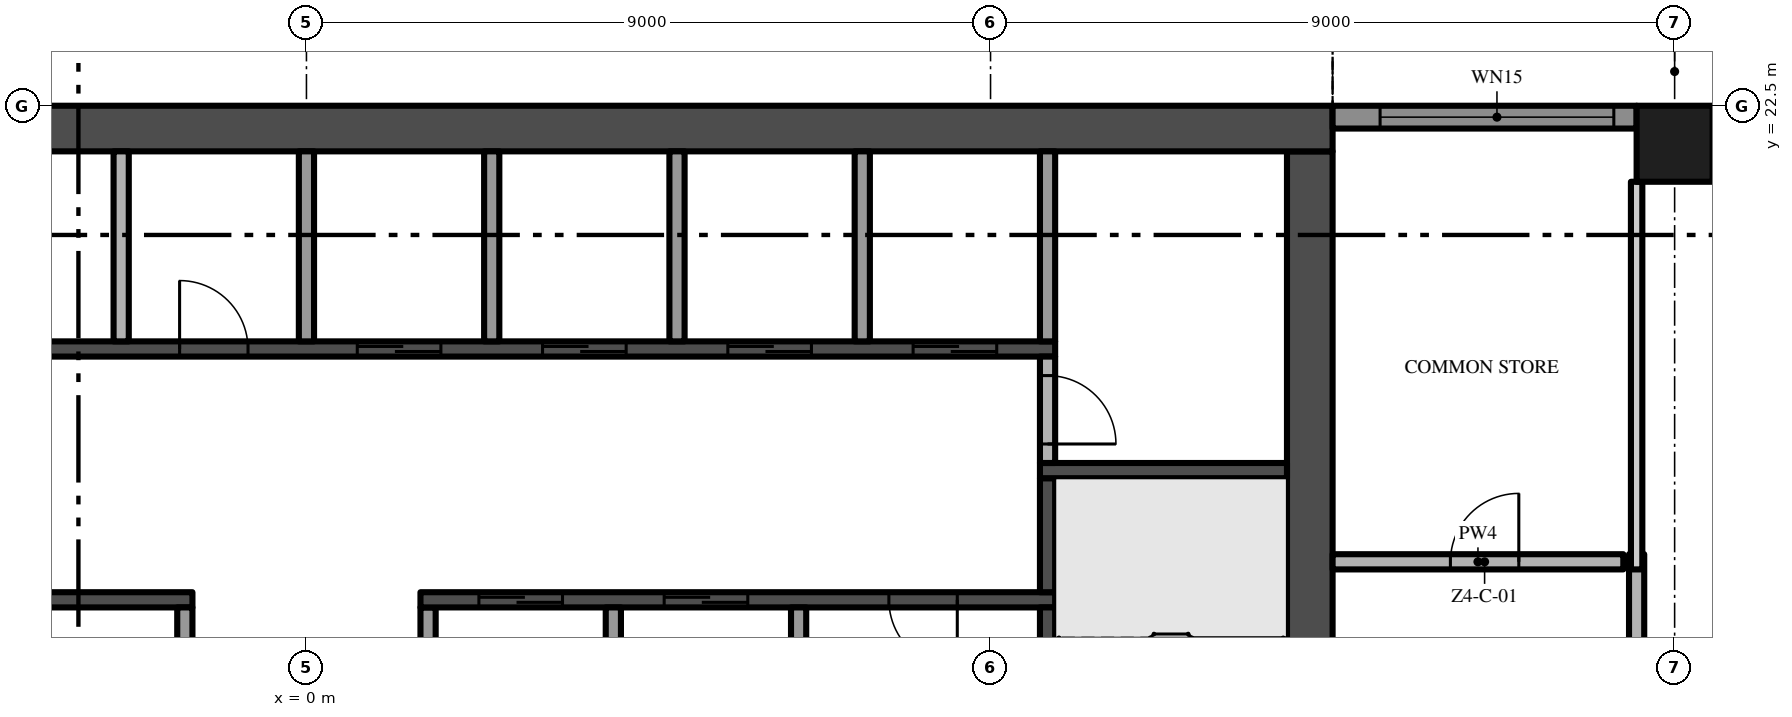
"""IFC4 building model, lengths in metres.
Left out: names, types, materials, properties, quantities, classifications, styles, units other than length and angle.
Written with IfcOpenShell. Run it as: python <this file> out.ifc"""

import sys

from ifc_helpers import new_model, si_unit, direction, frame, frame_2d, origin, origin_2d, place, context, subcontext, project, spatial, rectangle, extrude, element, fill, save


model = new_model("IFC4")
c1 = context("Model", 3, precision=1e-05, world=origin(), true_north=direction((0.0, 1.0)))
c2 = subcontext(c1, "Body", "Model", "MODEL_VIEW")
j1 = project(units=[si_unit("LENGTHUNIT", "METRE"), si_unit("PLANEANGLEUNIT", "RADIAN")], contexts=[c1])
p1 = place(None, origin())
s1 = spatial("IfcSite", under=j1, at=p1, CompositionType="ELEMENT")
p2 = place(p1, origin())
s2 = spatial("IfcBuilding", under=s1, at=p2, CompositionType="ELEMENT")
p3 = place(p2, frame((0.0, 0.0, 211.0)))
s3 = spatial("IfcBuildingStorey", under=s2, at=p3, CompositionType="ELEMENT", Elevation=211.0)
p4 = place(p3, frame((13.2, 5.1, -0.3), z_axis=(0.0, 0.0, 1.0), x_axis=(0.0, 1.0, 0.0)))
e1 = element("IfcWall", 1, at=p4, inside=s3, PredefinedType="SHEAR", context=c2, shape_type="SweptSolid", body=[
    extrude(rectangle(XDim=16.8, YDim=0.6, at=frame_2d((8.4, 0.0))), origin(), (0.0, 0.0, 1.0), 3.8),
])
p5 = place(p4, frame((6.3, 0.0, 0.3)))
e2 = element("IfcOpeningElement", 2, at=p5, cuts=e1, PredefinedType="OPENING", context=c2, shape_type="SweptSolid", body=[
    extrude(rectangle(XDim=1.2, YDim=2.2, at=frame_2d((0.6, 1.1))), frame((0.0, 0.31, 0.0), z_axis=(0.0, -1.0, 0.0), x_axis=(1.0, 0.0, 0.0)), (0.0, 0.0, 1.0), 0.62),
])
p6 = place(p3, frame((13.5, 22.2, -0.3), z_axis=(0.0, 0.0, 1.0), x_axis=(-1.0, 0.0, 0.0)))
e3 = element("IfcWall", 3, at=p6, inside=s3, PredefinedType="SHEAR", context=c2, shape_type="SweptSolid", body=[
    extrude(rectangle(XDim=27.0, YDim=0.6, at=frame_2d((13.5, 0.0))), origin(), (0.0, 0.0, 1.0), 3.8),
])
p7 = place(p3, frame((18.0, 22.0, 0.0), z_axis=(0.0, 0.0, 1.0), x_axis=(1.0, 0.0, 0.0)))
e4 = element("IfcColumn", 4, at=p7, inside=s3, PredefinedType="COLUMN", context=c2, shape_type="SweptSolid", body=[
    extrude(rectangle(XDim=1.0, YDim=1.0, at=origin_2d()), origin(), (0.0, 0.0, 1.0), 3.5),
])
p8 = place(p3, frame((13.5, 22.35, 0.0), z_axis=(0.0, 0.0, 1.0), x_axis=(1.0, 0.0, 0.0)))
e5 = element("IfcWall", 5, at=p8, inside=s3, PredefinedType="SOLIDWALL", context=c2, shape_type="SweptSolid", body=[
    extrude(rectangle(XDim=4.0, YDim=0.3, at=frame_2d((2.0, 0.0))), origin(), (0.0, 0.0, 1.0), 3.5),
])
p9 = place(p8, frame((0.625, 0.0, 0.45)))
e6 = element("IfcOpeningElement", 6, at=p9, cuts=e5, PredefinedType="OPENING", context=c2, shape_type="SweptSolid", body=[
    extrude(rectangle(XDim=3.075, YDim=2.65, at=frame_2d((1.538, 1.325))), frame((0.0, 0.16, 0.0), z_axis=(0.0, -1.0, 0.0), x_axis=(1.0, 0.0, 0.0)), (0.0, 0.0, 1.0), 0.32),
])
p10 = place(p3, frame((-1.5, 16.0, 0.0), z_axis=(0.0, 0.0, 1.0), x_axis=(-1.0, 0.0, 0.0)))
e7 = element("IfcWall", 7, at=p10, inside=s3, PredefinedType="SHEAR", context=c2, shape_type="SweptSolid", body=[
    extrude(rectangle(XDim=8.35, YDim=0.2, at=frame_2d((4.175, 0.0))), origin(), (0.0, 0.0, 1.0), 3.5),
])
p11 = place(p10, frame((6.162, 0.0, 0.0)))
e8 = element("IfcOpeningElement", 8, at=p11, cuts=e7, PredefinedType="OPENING", context=c2, shape_type="SweptSolid", body=[
    extrude(rectangle(XDim=0.9, YDim=2.1, at=frame_2d((0.45, 1.05))), frame((0.0, 0.11, 0.0), z_axis=(0.0, -1.0, 0.0), x_axis=(1.0, 0.0, 0.0)), (0.0, 0.0, 1.0), 0.22),
])
p12 = place(p3, frame((-9.85, 19.3, 0.0), z_axis=(0.0, 0.0, 1.0), x_axis=(1.0, 0.0, 0.0)))
e9 = element("IfcWall", 9, at=p12, inside=s3, PredefinedType="SHEAR", context=c2, shape_type="SweptSolid", body=[
    extrude(rectangle(XDim=19.7, YDim=0.2, at=frame_2d((9.85, 0.0))), origin(), (0.0, 0.0, 1.0), 3.5),
])
p13 = place(p12, frame((10.519, 0.0, 0.0)))
e10 = element("IfcOpeningElement", 10, at=p13, cuts=e9, PredefinedType="OPENING", context=c2, shape_type="SweptSolid", body=[
    extrude(rectangle(XDim=1.1, YDim=2.1, at=frame_2d((0.55, 1.05))), frame((0.0, 0.11, 0.0), z_axis=(0.0, -1.0, 0.0), x_axis=(1.0, 0.0, 0.0)), (0.0, 0.0, 1.0), 0.22),
])
p14 = place(p12, frame((12.956, 0.0, 0.0)))
e11 = element("IfcOpeningElement", 11, at=p14, cuts=e9, PredefinedType="OPENING", context=c2, shape_type="SweptSolid", body=[
    extrude(rectangle(XDim=1.1, YDim=2.1, at=frame_2d((0.55, 1.05))), frame((0.0, 0.11, 0.0), z_axis=(0.0, -1.0, 0.0), x_axis=(1.0, 0.0, 0.0)), (0.0, 0.0, 1.0), 0.22),
])
p15 = place(p12, frame((15.394, 0.0, 0.0)))
e12 = element("IfcOpeningElement", 12, at=p15, cuts=e9, PredefinedType="OPENING", context=c2, shape_type="SweptSolid", body=[
    extrude(rectangle(XDim=1.1, YDim=2.1, at=frame_2d((0.55, 1.05))), frame((0.0, 0.11, 0.0), z_axis=(0.0, -1.0, 0.0), x_axis=(1.0, 0.0, 0.0)), (0.0, 0.0, 1.0), 0.22),
])
p16 = place(p12, frame((17.831, 0.0, 0.0)))
e13 = element("IfcOpeningElement", 13, at=p16, cuts=e9, PredefinedType="OPENING", context=c2, shape_type="SweptSolid", body=[
    extrude(rectangle(XDim=1.1, YDim=2.1, at=frame_2d((0.55, 1.05))), frame((0.0, 0.11, 0.0), z_axis=(0.0, -1.0, 0.0), x_axis=(1.0, 0.0, 0.0)), (0.0, 0.0, 1.0), 0.22),
])
p17 = place(p12, frame((3.306, 0.0, 0.0)))
e14 = element("IfcOpeningElement", 14, at=p17, cuts=e9, PredefinedType="OPENING", context=c2, shape_type="SweptSolid", body=[
    extrude(rectangle(XDim=0.9, YDim=2.1, at=frame_2d((0.45, 1.05))), frame((0.0, 0.11, 0.0), z_axis=(0.0, -1.0, 0.0), x_axis=(1.0, 0.0, 0.0)), (0.0, 0.0, 1.0), 0.22),
])
p18 = place(p12, frame((8.181, 0.0, 0.0)))
e15 = element("IfcOpeningElement", 15, at=p18, cuts=e9, PredefinedType="OPENING", context=c2, shape_type="SweptSolid", body=[
    extrude(rectangle(XDim=0.9, YDim=2.1, at=frame_2d((0.45, 1.05))), frame((0.0, 0.11, 0.0), z_axis=(0.0, -1.0, 0.0), x_axis=(1.0, 0.0, 0.0)), (0.0, 0.0, 1.0), 0.22),
])
p19 = place(p3, frame((-2.438, 19.4, 0.0), z_axis=(0.0, 0.0, 1.0), x_axis=(0.0, 1.0, 0.0)))
e16 = element("IfcWall", 16, at=p19, inside=s3, PredefinedType="PARTITIONING", context=c2, shape_type="SweptSolid", body=[
    extrude(rectangle(XDim=2.5, YDim=0.2, at=frame_2d((1.25, 0.0))), origin(), (0.0, 0.0, 1.0), 3.5),
])
p20 = place(p3, frame((-1.6, 13.7, 0.0), z_axis=(0.0, 0.0, 1.0), x_axis=(0.0, 1.0, 0.0)))
e17 = element("IfcWall", 17, at=p20, inside=s3, PredefinedType="PARTITIONING", context=c2, shape_type="SweptSolid", body=[
    extrude(rectangle(XDim=2.2, YDim=0.2, at=frame_2d((1.1, 0.0))), origin(), (0.0, 0.0, 1.0), 3.5),
])
p21 = place(p3, frame((0.0, 19.4, 0.0), z_axis=(0.0, 0.0, 1.0), x_axis=(0.0, 1.0, 0.0)))
e18 = element("IfcWall", 18, at=p21, inside=s3, PredefinedType="PARTITIONING", context=c2, shape_type="SweptSolid", body=[
    extrude(rectangle(XDim=2.5, YDim=0.2, at=frame_2d((1.25, 0.0))), origin(), (0.0, 0.0, 1.0), 3.5),
])
p22 = place(p3, frame((1.6, 13.7, 0.0), z_axis=(0.0, 0.0, 1.0), x_axis=(0.0, 1.0, 0.0)))
e19 = element("IfcWall", 19, at=p22, inside=s3, PredefinedType="PARTITIONING", context=c2, shape_type="SweptSolid", body=[
    extrude(rectangle(XDim=2.2, YDim=0.2, at=frame_2d((1.1, 0.0))), origin(), (0.0, 0.0, 1.0), 3.5),
])
p23 = place(p3, frame((9.85, 16.0, 0.0), z_axis=(0.0, 0.0, 1.0), x_axis=(-1.0, 0.0, 0.0)))
e20 = element("IfcWall", 20, at=p23, inside=s3, PredefinedType="SHEAR", context=c2, shape_type="SweptSolid", body=[
    extrude(rectangle(XDim=8.35, YDim=0.2, at=frame_2d((4.175, 0.0))), origin(), (0.0, 0.0, 1.0), 3.5),
])
p24 = place(p23, frame((6.481, 0.0, 0.0)))
e21 = element("IfcOpeningElement", 21, at=p24, cuts=e20, PredefinedType="OPENING", context=c2, shape_type="SweptSolid", body=[
    extrude(rectangle(XDim=1.1, YDim=2.1, at=frame_2d((0.55, 1.05))), frame((0.0, 0.11, 0.0), z_axis=(0.0, -1.0, 0.0), x_axis=(1.0, 0.0, 0.0)), (0.0, 0.0, 1.0), 0.22),
])
p25 = place(p23, frame((4.044, 0.0, 0.0)))
e22 = element("IfcOpeningElement", 22, at=p25, cuts=e20, PredefinedType="OPENING", context=c2, shape_type="SweptSolid", body=[
    extrude(rectangle(XDim=1.1, YDim=2.1, at=frame_2d((0.55, 1.05))), frame((0.0, 0.11, 0.0), z_axis=(0.0, -1.0, 0.0), x_axis=(1.0, 0.0, 0.0)), (0.0, 0.0, 1.0), 0.22),
])
p26 = place(p23, frame((1.288, 0.0, 0.0)))
e23 = element("IfcOpeningElement", 23, at=p26, cuts=e20, PredefinedType="OPENING", context=c2, shape_type="SweptSolid", body=[
    extrude(rectangle(XDim=0.9, YDim=2.1, at=frame_2d((0.45, 1.05))), frame((0.0, 0.11, 0.0), z_axis=(0.0, -1.0, 0.0), x_axis=(1.0, 0.0, 0.0)), (0.0, 0.0, 1.0), 0.22),
])
p27 = place(p3, frame((2.438, 19.4, 0.0), z_axis=(0.0, 0.0, 1.0), x_axis=(0.0, 1.0, 0.0)))
e24 = element("IfcWall", 24, at=p27, inside=s3, PredefinedType="PARTITIONING", context=c2, shape_type="SweptSolid", body=[
    extrude(rectangle(XDim=2.5, YDim=0.2, at=frame_2d((1.25, 0.0))), origin(), (0.0, 0.0, 1.0), 3.5),
])
p28 = place(p3, frame((4.037, 13.7, 0.0), z_axis=(0.0, 0.0, 1.0), x_axis=(0.0, 1.0, 0.0)))
e25 = element("IfcWall", 25, at=p28, inside=s3, PredefinedType="PARTITIONING", context=c2, shape_type="SweptSolid", body=[
    extrude(rectangle(XDim=2.2, YDim=0.2, at=frame_2d((1.1, 0.0))), origin(), (0.0, 0.0, 1.0), 3.5),
])
p29 = place(p3, frame((4.875, 19.4, 0.0), z_axis=(0.0, 0.0, 1.0), x_axis=(0.0, 1.0, 0.0)))
e26 = element("IfcWall", 26, at=p29, inside=s3, PredefinedType="PARTITIONING", context=c2, shape_type="SweptSolid", body=[
    extrude(rectangle(XDim=2.5, YDim=0.2, at=frame_2d((1.25, 0.0))), origin(), (0.0, 0.0, 1.0), 3.5),
])
p30 = place(p3, frame((6.475, 13.7, 0.0), z_axis=(0.0, 0.0, 1.0), x_axis=(0.0, 1.0, 0.0)))
e27 = element("IfcWall", 27, at=p30, inside=s3, PredefinedType="PARTITIONING", context=c2, shape_type="SweptSolid", body=[
    extrude(rectangle(XDim=2.2, YDim=0.2, at=frame_2d((1.1, 0.0))), origin(), (0.0, 0.0, 1.0), 3.5),
])
p31 = place(p3, frame((7.312, 19.4, 0.0), z_axis=(0.0, 0.0, 1.0), x_axis=(0.0, 1.0, 0.0)))
e28 = element("IfcWall", 28, at=p31, inside=s3, PredefinedType="PARTITIONING", context=c2, shape_type="SweptSolid", body=[
    extrude(rectangle(XDim=2.5, YDim=0.2, at=frame_2d((1.25, 0.0))), origin(), (0.0, 0.0, 1.0), 3.5),
])
p32 = place(p3, frame((9.75, 12.3, 0.0), z_axis=(0.0, 0.0, 1.0), x_axis=(0.0, 1.0, 0.0)))
e29 = element("IfcWall", 29, at=p32, inside=s3, PredefinedType="SHEAR", context=c2, shape_type="SweptSolid", body=[
    extrude(rectangle(XDim=3.6, YDim=0.2, at=frame_2d((1.8, 0.0))), origin(), (0.0, 0.0, 1.0), 3.5),
])
p33 = place(p3, frame((9.75, 16.1, 0.0), z_axis=(0.0, 0.0, 1.0), x_axis=(0.0, 1.0, 0.0)))
e30 = element("IfcWall", 30, at=p33, inside=s3, PredefinedType="SHEAR", context=c2, shape_type="SweptSolid", body=[
    extrude(rectangle(XDim=1.5, YDim=0.2, at=frame_2d((0.75, 0.0))), origin(), (0.0, 0.0, 1.0), 3.5),
])
p34 = place(p3, frame((9.65, 17.7, 0.0), z_axis=(0.0, 0.0, 1.0), x_axis=(1.0, 0.0, 0.0)))
e31 = element("IfcWall", 31, at=p34, inside=s3, PredefinedType="SHEAR", context=c2, shape_type="SweptSolid", body=[
    extrude(rectangle(XDim=3.25, YDim=0.2, at=frame_2d((1.625, 0.0))), origin(), (0.0, 0.0, 1.0), 3.5),
])
p35 = place(p3, frame((9.75, 19.2, 0.0), z_axis=(0.0, 0.0, 1.0), x_axis=(0.0, -1.0, 0.0)))
e32 = element("IfcWall", 32, at=p35, inside=s3, PredefinedType="PARTITIONING", context=c2, shape_type="SweptSolid", body=[
    extrude(rectangle(XDim=1.4, YDim=0.2, at=frame_2d((0.7, 0.0))), origin(), (0.0, 0.0, 1.0), 3.5),
])
p36 = place(p35, frame((0.25, 0.0, 0.0)))
e33 = element("IfcOpeningElement", 33, at=p36, cuts=e32, PredefinedType="OPENING", context=c2, shape_type="SweptSolid", body=[
    extrude(rectangle(XDim=0.9, YDim=2.1, at=frame_2d((0.45, 1.05))), frame((0.0, 0.11, 0.0), z_axis=(0.0, -1.0, 0.0), x_axis=(1.0, 0.0, 0.0)), (0.0, 0.0, 1.0), 0.22),
])
p37 = place(p3, frame((9.75, 19.4, 0.0), z_axis=(0.0, 0.0, 1.0), x_axis=(0.0, 1.0, 0.0)))
e34 = element("IfcWall", 34, at=p37, inside=s3, PredefinedType="PARTITIONING", context=c2, shape_type="SweptSolid", body=[
    extrude(rectangle(XDim=2.5, YDim=0.2, at=frame_2d((1.25, 0.0))), origin(), (0.0, 0.0, 1.0), 3.5),
])
p38 = place(p3, frame((13.5, 16.5, 0.0), z_axis=(0.0, 0.0, 1.0), x_axis=(1.0, 0.0, 0.0)))
e35 = element("IfcWall", 35, at=p38, inside=s3, PredefinedType="PARTITIONING", context=c2, shape_type="SweptSolid", body=[
    extrude(rectangle(XDim=3.825, YDim=0.2, at=frame_2d((1.913, 0.0))), origin(), (0.0, 0.0, 1.0), 3.5),
])
p39 = place(p38, frame((1.55, 0.0, 0.0)))
e36 = element("IfcOpeningElement", 36, at=p39, cuts=e35, PredefinedType="OPENING", context=c2, shape_type="SweptSolid", body=[
    extrude(rectangle(XDim=0.9, YDim=2.1, at=frame_2d((0.45, 1.05))), frame((0.0, 0.11, 0.0), z_axis=(0.0, -1.0, 0.0), x_axis=(1.0, 0.0, 0.0)), (0.0, 0.0, 1.0), 0.22),
])
p40 = place(p3, frame((17.5, 16.6, 0.0), z_axis=(0.0, 0.0, 1.0), x_axis=(0.0, -1.0, 0.0)))
e37 = element("IfcWall", 37, at=p40, inside=s3, PredefinedType="PARTITIONING", context=c2, shape_type="SweptSolid", body=[
    extrude(rectangle(XDim=2.55, YDim=0.2, at=frame_2d((1.275, 0.0))), origin(), (0.0, 0.0, 1.0), 3.5),
])
p41 = place(p40, frame((1.2, 0.0, 0.0)))
e38 = element("IfcOpeningElement", 38, at=p41, cuts=e37, PredefinedType="OPENING", context=c2, shape_type="SweptSolid", body=[
    extrude(rectangle(XDim=1.2, YDim=2.4, at=frame_2d((0.6, 1.2))), frame((0.0, 0.11, 0.0), z_axis=(0.0, -1.0, 0.0), x_axis=(1.0, 0.0, 0.0)), (0.0, 0.0, 1.0), 0.22),
])
p42 = place(p3, frame((17.5, 16.4, 0.0), z_axis=(0.0, 0.0, 1.0), x_axis=(0.0, 1.0, 0.0)))
e39 = element("IfcWall", 39, at=p42, inside=s3, PredefinedType="PARTITIONING", context=c2, shape_type="SweptSolid", body=[
    extrude(rectangle(XDim=5.1, YDim=0.15, at=frame_2d((2.55, 0.0))), origin(), (0.0, 0.0, 1.0), 3.5),
])
p43 = place(p9, origin())
e40 = element("IfcWindow", 40, at=p43, inside=s3, PartitioningType="SINGLE_PANEL", PredefinedType="WINDOW", context=c2, shape_type="SweptSolid", body=[
    extrude(rectangle(XDim=3.075, YDim=2.65, at=frame_2d((1.538, 1.325))), frame((0.0, 0.03, 0.0), z_axis=(0.0, -1.0, 0.0), x_axis=(1.0, 0.0, 0.0)), (0.0, 0.0, 1.0), 0.06),
])
fill(e6, e40)
p44 = place(p13, origin())
e41 = element("IfcDoor", 41, at=p44, inside=s3, OperationType="SLIDING_TO_RIGHT", PredefinedType="DOOR", context=c2, shape_type="SweptSolid", body=[
    extrude(rectangle(XDim=1.1, YDim=2.1, at=frame_2d((0.55, 1.05))), frame((0.0, 0.025, 0.0), z_axis=(0.0, -1.0, 0.0), x_axis=(1.0, 0.0, 0.0)), (0.0, 0.0, 1.0), 0.05),
])
fill(e10, e41)
p45 = place(p14, origin())
e42 = element("IfcDoor", 42, at=p45, inside=s3, OperationType="SLIDING_TO_RIGHT", PredefinedType="DOOR", context=c2, shape_type="SweptSolid", body=[
    extrude(rectangle(XDim=1.1, YDim=2.1, at=frame_2d((0.55, 1.05))), frame((0.0, 0.025, 0.0), z_axis=(0.0, -1.0, 0.0), x_axis=(1.0, 0.0, 0.0)), (0.0, 0.0, 1.0), 0.05),
])
fill(e11, e42)
p46 = place(p15, origin())
e43 = element("IfcDoor", 43, at=p46, inside=s3, OperationType="SLIDING_TO_RIGHT", PredefinedType="DOOR", context=c2, shape_type="SweptSolid", body=[
    extrude(rectangle(XDim=1.1, YDim=2.1, at=frame_2d((0.55, 1.05))), frame((0.0, 0.025, 0.0), z_axis=(0.0, -1.0, 0.0), x_axis=(1.0, 0.0, 0.0)), (0.0, 0.0, 1.0), 0.05),
])
fill(e12, e43)
p47 = place(p16, origin())
e44 = element("IfcDoor", 44, at=p47, inside=s3, OperationType="SLIDING_TO_RIGHT", PredefinedType="DOOR", context=c2, shape_type="SweptSolid", body=[
    extrude(rectangle(XDim=1.1, YDim=2.1, at=frame_2d((0.55, 1.05))), frame((0.0, 0.025, 0.0), z_axis=(0.0, -1.0, 0.0), x_axis=(1.0, 0.0, 0.0)), (0.0, 0.0, 1.0), 0.05),
])
fill(e13, e44)
p48 = place(p24, origin())
e45 = element("IfcDoor", 45, at=p48, inside=s3, OperationType="SLIDING_TO_RIGHT", PredefinedType="DOOR", context=c2, shape_type="SweptSolid", body=[
    extrude(rectangle(XDim=1.1, YDim=2.1, at=frame_2d((0.55, 1.05))), frame((0.0, 0.025, 0.0), z_axis=(0.0, -1.0, 0.0), x_axis=(1.0, 0.0, 0.0)), (0.0, 0.0, 1.0), 0.05),
])
fill(e21, e45)
p49 = place(p25, origin())
e46 = element("IfcDoor", 46, at=p49, inside=s3, OperationType="SLIDING_TO_RIGHT", PredefinedType="DOOR", context=c2, shape_type="SweptSolid", body=[
    extrude(rectangle(XDim=1.1, YDim=2.1, at=frame_2d((0.55, 1.05))), frame((0.0, 0.025, 0.0), z_axis=(0.0, -1.0, 0.0), x_axis=(1.0, 0.0, 0.0)), (0.0, 0.0, 1.0), 0.05),
])
fill(e22, e46)
p50 = place(p26, origin())
e47 = element("IfcDoor", 47, at=p50, inside=s3, OperationType="SINGLE_SWING_LEFT", PredefinedType="DOOR", context=c2, shape_type="SweptSolid", body=[
    extrude(rectangle(XDim=0.9, YDim=2.1, at=frame_2d((0.45, 1.05))), frame((0.0, 0.025, 0.0), z_axis=(0.0, -1.0, 0.0), x_axis=(1.0, 0.0, 0.0)), (0.0, 0.0, 1.0), 0.05),
])
fill(e23, e47)
p51 = place(p36, origin())
e48 = element("IfcDoor", 48, at=p51, inside=s3, OperationType="SINGLE_SWING_RIGHT", PredefinedType="DOOR", context=c2, shape_type="SweptSolid", body=[
    extrude(rectangle(XDim=0.9, YDim=2.1, at=frame_2d((0.45, 1.05))), frame((0.0, 0.025, 0.0), z_axis=(0.0, -1.0, 0.0), x_axis=(1.0, 0.0, 0.0)), (0.0, 0.0, 1.0), 0.05),
])
fill(e33, e48)
p52 = place(p18, origin())
e49 = element("IfcDoor", 49, at=p52, inside=s3, OperationType="SINGLE_SWING_LEFT", PredefinedType="DOOR", context=c2, shape_type="SweptSolid", body=[
    extrude(rectangle(XDim=0.9, YDim=2.1, at=frame_2d((0.45, 1.05))), frame((0.0, 0.025, 0.0), z_axis=(0.0, -1.0, 0.0), x_axis=(1.0, 0.0, 0.0)), (0.0, 0.0, 1.0), 0.05),
])
fill(e15, e49)
p53 = place(p39, origin())
e50 = element("IfcDoor", 50, at=p53, inside=s3, OperationType="SINGLE_SWING_RIGHT", PredefinedType="DOOR", context=c2, shape_type="SweptSolid", body=[
    extrude(rectangle(XDim=0.9, YDim=2.1, at=frame_2d((0.45, 1.05))), frame((0.0, 0.025, 0.0), z_axis=(0.0, -1.0, 0.0), x_axis=(1.0, 0.0, 0.0)), (0.0, 0.0, 1.0), 0.05),
])
fill(e36, e50)
save(model, sys.argv[1])
